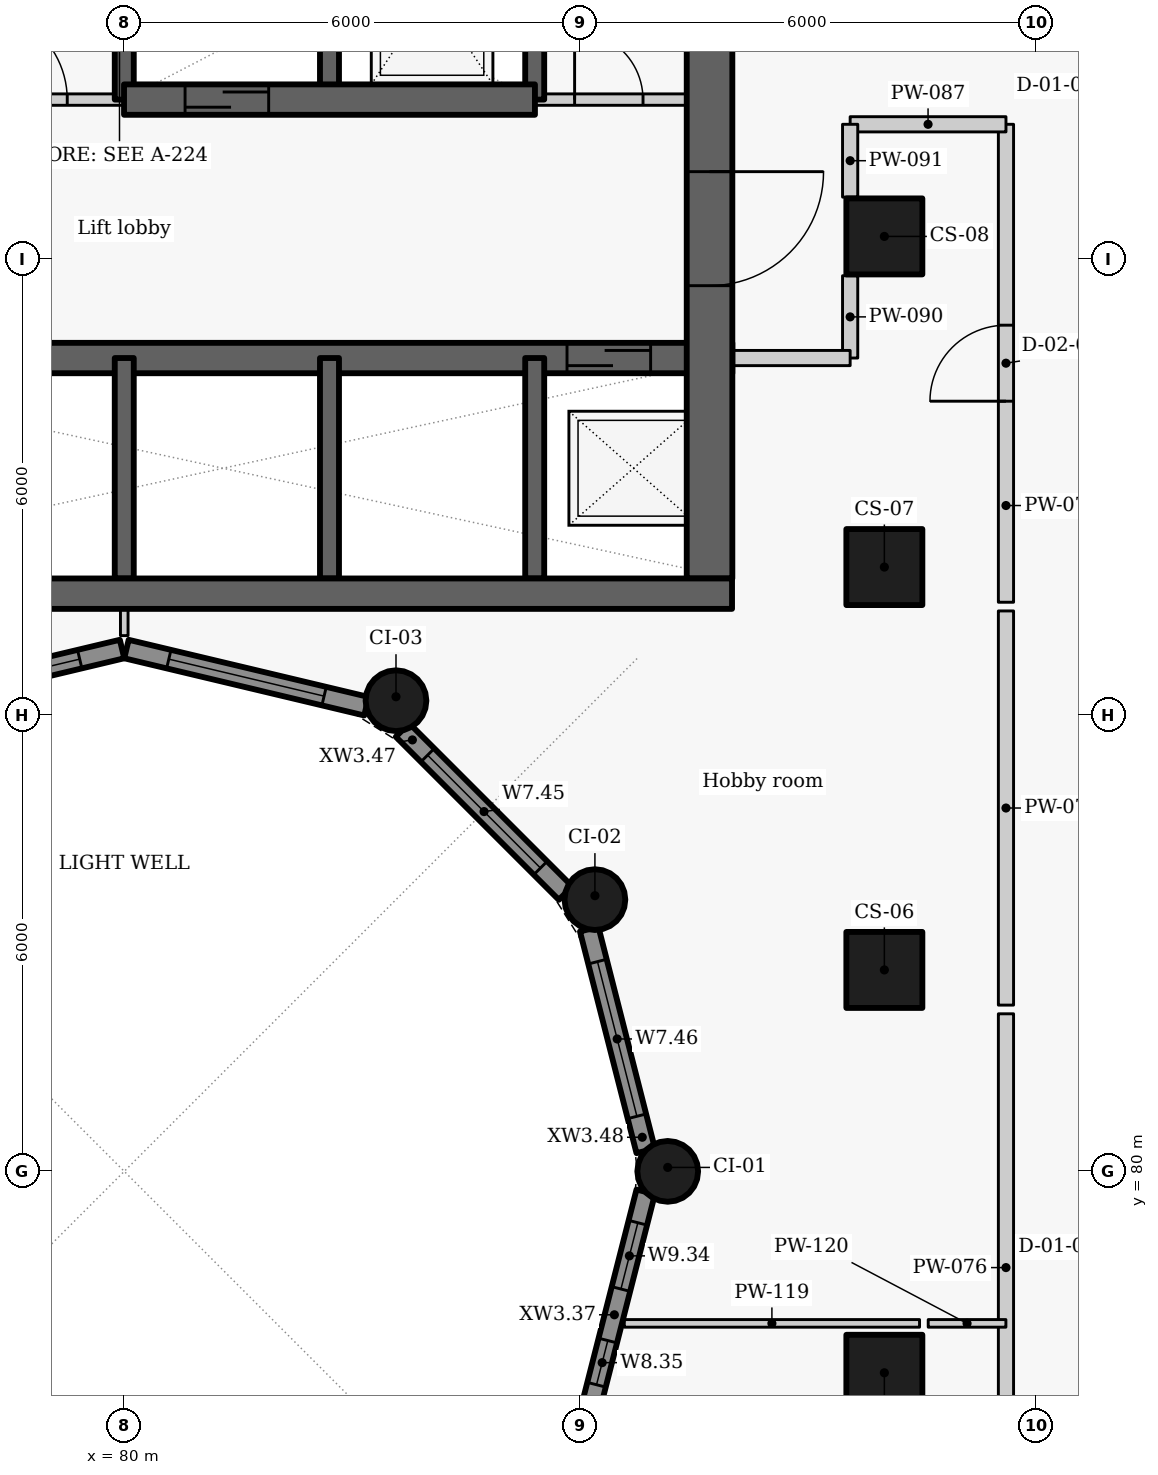
"""IFC4 building model, lengths in metres.
Left out: names, types, materials, properties, quantities, classifications, styles, units other than length and angle.
Written with IfcOpenShell. Run it as: python <this file> out.ifc"""

import sys

from ifc_helpers import new_model, si_unit, direction, frame, frame_2d, origin, origin_2d, place, context, subcontext, project, spatial, rectangle, circle, extrude, element, fill, save


model = new_model("IFC4")
c1 = context("Model", 3, precision=1e-05, world=origin(), true_north=direction((0.0, 1.0)))
c2 = subcontext(c1, "Body", "Model", "MODEL_VIEW")
j1 = project(units=[si_unit("LENGTHUNIT", "METRE"), si_unit("PLANEANGLEUNIT", "RADIAN")], contexts=[c1])
p1 = place(None, origin())
s1 = spatial("IfcSite", under=j1, at=p1, CompositionType="ELEMENT")
p2 = place(p1, origin())
s2 = spatial("IfcBuilding", under=s1, at=p2, CompositionType="ELEMENT")
p3 = place(p2, frame((0.0, 0.0, 127.2)))
s3 = spatial("IfcBuildingStorey", under=s2, at=p3, CompositionType="ELEMENT", Elevation=127.2)
for number, where, z_axis, x_axis in (
    (1, (90.0, 77.35, 0.0), (0.0, 0.0, 1.0), (0.0, 1.0, 0.0)),
    (2, (90.0, 82.65, 0.0), (0.0, 0.0, 1.0), (0.0, 1.0, 0.0)),
    (3, (90.0, 87.95, 0.0), (0.0, 0.0, 1.0), (0.0, 1.0, 0.0)),
    (4, (90.0, 92.3, 0.0), (0.0, 0.0, 1.0), (0.0, 1.0, 0.0)),
):
    element("IfcColumn", number, at=place(p3, frame(where, z_axis=z_axis, x_axis=x_axis)), inside=s3, PredefinedType="COLUMN", context=c2, shape_type="SweptSolid", body=[
        extrude(rectangle(XDim=1.0, YDim=1.0, at=origin_2d()), origin(), (0.0, 0.0, 1.0), 3.3),
    ])
for number, where, z_axis, x_axis in (
    (5, (87.15, 80.0, 0.0), (0.0, 0.0, 1.0), (0.0, 1.0, 0.0)),
    (6, (86.192, 83.575, 0.0), (0.0, 0.0, 1.0), (-0.5, 0.866, 0.0)),
    (7, (83.575, 86.192, 0.0), (0.0, 0.0, 1.0), (-0.866, 0.5, 0.0)),
):
    element("IfcColumn", number, at=place(p3, frame(where, z_axis=z_axis, x_axis=x_axis)), inside=s3, PredefinedType="COLUMN", context=c2, shape_type="SweptSolid", body=[
        extrude(circle(Radius=0.4, at=origin_2d()), origin(), (0.0, 0.0, 1.0), 3.3),
    ])
p4 = place(p3, frame((86.86, 79.73, 0.0), z_axis=(0.0, 0.0, 1.0), x_axis=(-0.247055971283, -0.969001211069, 0.0)))
e8 = element("IfcWall", 8, at=p4, inside=s3, PredefinedType="SOLIDWALL", context=c2, shape_type="SweptSolid", body=[
    extrude(rectangle(XDim=3.01, YDim=0.25, at=frame_2d((1.505, 0.0))), origin(), (0.0, 0.0, 1.0), 2.425),
])
p5 = place(p4, frame((0.419, 0.0, 0.9)))
e9 = element("IfcOpeningElement", 9, at=p5, cuts=e8, PredefinedType="OPENING", context=c2, shape_type="SweptSolid", body=[
    extrude(rectangle(XDim=0.9, YDim=1.1, at=frame_2d((0.45, 0.55))), frame((0.0, 0.135, 0.0), z_axis=(0.0, -1.0, 0.0), x_axis=(1.0, 0.0, 0.0)), (0.0, 0.0, 1.0), 0.27),
])
p6 = place(p4, frame((2.018, 0.0, 0.9)))
e10 = element("IfcOpeningElement", 10, at=p6, cuts=e8, PredefinedType="OPENING", context=c2, shape_type="SweptSolid", body=[
    extrude(rectangle(XDim=0.6, YDim=1.1, at=frame_2d((0.3, 0.55))), frame((0.0, 0.135, 0.0), z_axis=(0.0, -1.0, 0.0), x_axis=(1.0, 0.0, 0.0)), (0.0, 0.0, 1.0), 0.27),
])
p7 = place(p3, frame((76.814, 86.119, 0.0), z_axis=(0.0, 0.0, 1.0), x_axis=(0.972773113459, 0.231759508395, 0.0)))
e11 = element("IfcWall", 11, at=p7, inside=s3, PredefinedType="SOLIDWALL", context=c2, shape_type="SweptSolid", body=[
    extrude(rectangle(XDim=3.246, YDim=0.25, at=frame_2d((1.623, 0.0))), origin(), (0.0, 0.0, 1.0), 2.425),
])
p8 = place(p7, frame((0.573, 0.0, 0.9)))
e12 = element("IfcOpeningElement", 12, at=p8, cuts=e11, PredefinedType="OPENING", context=c2, shape_type="SweptSolid", body=[
    extrude(rectangle(XDim=2.1, YDim=1.1, at=frame_2d((1.05, 0.55))), frame((0.0, 0.135, 0.0), z_axis=(0.0, -1.0, 0.0), x_axis=(1.0, 0.0, 0.0)), (0.0, 0.0, 1.0), 0.27),
])
p9 = place(p3, frame((80.029, 86.872, 0.0), z_axis=(0.0, 0.0, 1.0), x_axis=(0.972773113459, -0.231759508395, 0.0)))
e13 = element("IfcWall", 13, at=p9, inside=s3, PredefinedType="SOLIDWALL", context=c2, shape_type="SweptSolid", body=[
    extrude(rectangle(XDim=3.246, YDim=0.25, at=frame_2d((1.623, 0.0))), origin(), (0.0, 0.0, 1.0), 2.425),
])
p10 = place(p9, frame((0.573, 0.0, 0.9)))
e14 = element("IfcOpeningElement", 14, at=p10, cuts=e13, PredefinedType="OPENING", context=c2, shape_type="SweptSolid", body=[
    extrude(rectangle(XDim=2.1, YDim=1.1, at=frame_2d((1.05, 0.55))), frame((0.0, 0.135, 0.0), z_axis=(0.0, -1.0, 0.0), x_axis=(1.0, 0.0, 0.0)), (0.0, 0.0, 1.0), 0.27),
])
p11 = place(p3, frame((83.661, 85.806, 0.0), z_axis=(0.0, 0.0, 1.0), x_axis=(0.707106781187, -0.707106781187, 0.0)))
e15 = element("IfcWall", 15, at=p11, inside=s3, PredefinedType="SOLIDWALL", context=c2, shape_type="SweptSolid", body=[
    extrude(rectangle(XDim=3.033, YDim=0.25, at=frame_2d((1.517, 0.0))), origin(), (0.0, 0.0, 1.0), 2.425),
])
p12 = place(p11, frame((0.467, 0.0, 0.9)))
e16 = element("IfcOpeningElement", 16, at=p12, cuts=e15, PredefinedType="OPENING", context=c2, shape_type="SweptSolid", body=[
    extrude(rectangle(XDim=2.1, YDim=1.1, at=frame_2d((1.05, 0.55))), frame((0.0, 0.135, 0.0), z_axis=(0.0, -1.0, 0.0), x_axis=(1.0, 0.0, 0.0)), (0.0, 0.0, 1.0), 0.27),
])
p13 = place(p3, frame((86.117, 83.187, 0.0), z_axis=(0.0, 0.0, 1.0), x_axis=(0.247055971283, -0.969001211069, 0.0)))
e17 = element("IfcWall", 17, at=p13, inside=s3, PredefinedType="SOLIDWALL", context=c2, shape_type="SweptSolid", body=[
    extrude(rectangle(XDim=3.01, YDim=0.25, at=frame_2d((1.505, 0.0))), origin(), (0.0, 0.0, 1.0), 2.425),
])
p14 = place(p13, frame((0.441, 0.0, 0.9)))
e18 = element("IfcOpeningElement", 18, at=p14, cuts=e17, PredefinedType="OPENING", context=c2, shape_type="SweptSolid", body=[
    extrude(rectangle(XDim=2.1, YDim=1.1, at=frame_2d((1.05, 0.55))), frame((0.0, 0.135, 0.0), z_axis=(0.0, -1.0, 0.0), x_axis=(1.0, 0.0, 0.0)), (0.0, 0.0, 1.0), 0.27),
])
p15 = place(p3, frame((74.6, 90.7, -0.41), z_axis=(0.0, 0.0, 1.0), x_axis=(1.0, 0.0, 0.0)))
e19 = element("IfcWall", 19, at=p15, inside=s3, PredefinedType="SHEAR", context=c2, shape_type="SweptSolid", body=[
    extrude(rectangle(XDim=13.4, YDim=0.4, at=frame_2d((6.7, 0.0))), origin(), (0.0, 0.0, 1.0), 3.435),
])
p16 = place(p15, frame((11.225, 0.0, 0.41)))
e20 = element("IfcOpeningElement", 20, at=p16, cuts=e19, PredefinedType="OPENING", context=c2, shape_type="SweptSolid", body=[
    extrude(rectangle(XDim=1.1, YDim=2.1, at=frame_2d((0.55, 1.05))), frame((0.0, 0.21, 0.0), z_axis=(0.0, -1.0, 0.0), x_axis=(1.0, 0.0, 0.0)), (0.0, 0.0, 1.0), 0.42),
])
p17 = place(p3, frame((80.0, 87.8, -0.41), z_axis=(0.0, 0.0, 1.0), x_axis=(0.0, 1.0, 0.0)))
e21 = element("IfcWall", 21, at=p17, inside=s3, PredefinedType="SHEAR", context=c2, shape_type="SweptSolid", body=[
    extrude(rectangle(XDim=2.9, YDim=0.25, at=frame_2d((1.45, 0.0))), origin(), (0.0, 0.0, 1.0), 3.435),
])
p18 = place(p3, frame((80.0, 94.1, -0.41), z_axis=(0.0, 0.0, 1.0), x_axis=(0.0, 1.0, 0.0)))
e22 = element("IfcWall", 22, at=p18, inside=s3, PredefinedType="SHEAR", context=c2, shape_type="SweptSolid", body=[
    extrude(rectangle(XDim=2.8, YDim=0.25, at=frame_2d((1.4, 0.0))), origin(), (0.0, 0.0, 1.0), 3.435),
])
p19 = place(p3, frame((82.7, 87.8, -0.41), z_axis=(0.0, 0.0, 1.0), x_axis=(0.0, 1.0, 0.0)))
e23 = element("IfcWall", 23, at=p19, inside=s3, PredefinedType="SHEAR", context=c2, shape_type="SweptSolid", body=[
    extrude(rectangle(XDim=2.9, YDim=0.25, at=frame_2d((1.45, 0.0))), origin(), (0.0, 0.0, 1.0), 3.435),
])
p20 = place(p3, frame((82.7, 94.1, -0.41), z_axis=(0.0, 0.0, 1.0), x_axis=(0.0, 1.0, 0.0)))
e24 = element("IfcWall", 24, at=p20, inside=s3, PredefinedType="SHEAR", context=c2, shape_type="SweptSolid", body=[
    extrude(rectangle(XDim=2.8, YDim=0.25, at=frame_2d((1.4, 0.0))), origin(), (0.0, 0.0, 1.0), 3.435),
])
p21 = place(p3, frame((85.4, 87.8, -0.41), z_axis=(0.0, 0.0, 1.0), x_axis=(0.0, 1.0, 0.0)))
e25 = element("IfcWall", 25, at=p21, inside=s3, PredefinedType="SHEAR", context=c2, shape_type="SweptSolid", body=[
    extrude(rectangle(XDim=2.9, YDim=0.25, at=frame_2d((1.45, 0.0))), origin(), (0.0, 0.0, 1.0), 3.435),
])
p22 = place(p3, frame((85.4, 94.1, -0.41), z_axis=(0.0, 0.0, 1.0), x_axis=(0.0, 1.0, 0.0)))
e26 = element("IfcWall", 26, at=p22, inside=s3, PredefinedType="SHEAR", context=c2, shape_type="SweptSolid", body=[
    extrude(rectangle(XDim=2.8, YDim=0.25, at=frame_2d((1.4, 0.0))), origin(), (0.0, 0.0, 1.0), 3.435),
])
p23 = place(p3, frame((87.7, 103.4, -0.41), z_axis=(0.0, 0.0, 1.0), x_axis=(0.0, -1.0, 0.0)))
e27 = element("IfcWall", 27, at=p23, inside=s3, PredefinedType="SHEAR", context=c2, shape_type="SweptSolid", body=[
    extrude(rectangle(XDim=15.6, YDim=0.6, at=frame_2d((7.8, 0.0))), origin(), (0.0, 0.0, 1.0), 3.435),
])
p24 = place(p23, frame((10.248, 0.0, 0.41)))
e28 = element("IfcOpeningElement", 28, at=p24, cuts=e27, PredefinedType="OPENING", context=c2, shape_type="SweptSolid", body=[
    extrude(rectangle(XDim=1.5, YDim=2.1, at=frame_2d((0.75, 1.05))), frame((0.0, 0.31, 0.0), z_axis=(0.0, -1.0, 0.0), x_axis=(1.0, 0.0, 0.0)), (0.0, 0.0, 1.0), 0.62),
])
p25 = place(p3, frame((77.297, 94.1, 0.0), z_axis=(0.0, 0.0, 1.0), x_axis=(1.0, 0.0, 0.0)))
e29 = element("IfcWall", 29, at=p25, inside=s3, PredefinedType="PARTITIONING", context=c2, shape_type="SweptSolid", body=[
    extrude(rectangle(XDim=2.706, YDim=0.15, at=frame_2d((1.353, 0.0))), origin(), (0.0, 0.0, 1.0), 3.025),
])
p26 = place(p25, frame((0.753, 0.0, 0.0)))
e30 = element("IfcOpeningElement", 30, at=p26, cuts=e29, PredefinedType="OPENING", context=c2, shape_type="SweptSolid", body=[
    extrude(rectangle(XDim=1.2, YDim=2.1, at=frame_2d((0.6, 1.05))), frame((0.0, 0.085, 0.0), z_axis=(0.0, -1.0, 0.0), x_axis=(1.0, 0.0, 0.0)), (0.0, 0.0, 1.0), 0.17),
])
p27 = place(p3, frame((85.397, 94.1, 0.0), z_axis=(0.0, 0.0, 1.0), x_axis=(1.0, 0.0, 0.0)))
e31 = element("IfcWall", 31, at=p27, inside=s3, PredefinedType="PARTITIONING", context=c2, shape_type="SweptSolid", body=[
    extrude(rectangle(XDim=2.603, YDim=0.15, at=frame_2d((1.302, 0.0))), origin(), (0.0, 0.0, 1.0), 3.025),
])
p28 = place(p27, frame((0.528, 0.0, 0.0)))
e32 = element("IfcOpeningElement", 32, at=p28, cuts=e31, PredefinedType="OPENING", context=c2, shape_type="SweptSolid", body=[
    extrude(rectangle(XDim=0.9, YDim=2.1, at=frame_2d((0.45, 1.05))), frame((0.0, 0.085, 0.0), z_axis=(0.0, -1.0, 0.0), x_axis=(1.0, 0.0, 0.0)), (0.0, 0.0, 1.0), 0.17),
])
p29 = place(p3, frame((79.997, 94.1, -0.41), z_axis=(0.0, 0.0, 1.0), x_axis=(1.0, 0.0, 0.0)))
e33 = element("IfcWall", 33, at=p29, inside=s3, PredefinedType="SHEAR", context=c2, shape_type="SweptSolid", body=[
    extrude(rectangle(XDim=5.406, YDim=0.4, at=frame_2d((2.703, 0.0))), origin(), (0.0, 0.0, 1.0), 3.435),
])
p30 = place(p29, frame((0.803, 0.0, 0.41)))
e34 = element("IfcOpeningElement", 34, at=p30, cuts=e33, PredefinedType="OPENING", context=c2, shape_type="SweptSolid", body=[
    extrude(rectangle(XDim=1.1, YDim=2.1, at=frame_2d((0.55, 1.05))), frame((0.0, 0.21, 0.0), z_axis=(0.0, -1.0, 0.0), x_axis=(1.0, 0.0, 0.0)), (0.0, 0.0, 1.0), 0.42),
])
p31 = place(p3, frame((91.6, 71.587, 0.0), z_axis=(0.0, 0.0, 1.0), x_axis=(0.0, 1.0, 0.0)))
e35 = element("IfcWall", 35, at=p31, inside=s3, PredefinedType="PARTITIONING", context=c2, shape_type="SweptSolid", body=[
    extrude(rectangle(XDim=10.486, YDim=0.2, at=frame_2d((5.243, 0.0))), origin(), (0.0, 0.0, 1.0), 3.025),
])
p32 = place(p31, frame((2.708, 0.0, 0.0)))
e36 = element("IfcOpeningElement", 36, at=p32, cuts=e35, PredefinedType="OPENING", context=c2, shape_type="SweptSolid", body=[
    extrude(rectangle(XDim=1.0, YDim=2.1, at=frame_2d((0.5, 1.05))), frame((0.0, 0.11, 0.0), z_axis=(0.0, -1.0, 0.0), x_axis=(1.0, 0.0, 0.0)), (0.0, 0.0, 1.0), 0.22),
])
p33 = place(p3, frame((91.6, 82.187, 0.0), z_axis=(0.0, 0.0, 1.0), x_axis=(0.0, 1.0, 0.0)))
e37 = element("IfcWall", 37, at=p33, inside=s3, PredefinedType="PARTITIONING", context=c2, shape_type="SweptSolid", body=[
    extrude(rectangle(XDim=5.186, YDim=0.2, at=frame_2d((2.593, 0.0))), origin(), (0.0, 0.0, 1.0), 3.025),
])
p34 = place(p3, frame((91.6, 87.487, 0.0), z_axis=(0.0, 0.0, 1.0), x_axis=(0.0, 1.0, 0.0)))
e38 = element("IfcWall", 38, at=p34, inside=s3, PredefinedType="PARTITIONING", context=c2, shape_type="SweptSolid", body=[
    extrude(rectangle(XDim=6.288, YDim=0.2, at=frame_2d((3.144, 0.0))), origin(), (0.0, 0.0, 1.0), 3.025),
])
p35 = place(p34, frame((2.645, 0.0, 0.0)))
e39 = element("IfcOpeningElement", 39, at=p35, cuts=e38, PredefinedType="OPENING", context=c2, shape_type="SweptSolid", body=[
    extrude(rectangle(XDim=1.0, YDim=2.1, at=frame_2d((0.5, 1.05))), frame((0.0, 0.11, 0.0), z_axis=(0.0, -1.0, 0.0), x_axis=(1.0, 0.0, 0.0)), (0.0, 0.0, 1.0), 0.22),
])
p36 = place(p3, frame((89.55, 93.775, 0.0), z_axis=(0.0, 0.0, 1.0), x_axis=(1.0, 0.0, 0.0)))
e40 = element("IfcWall", 40, at=p36, inside=s3, PredefinedType="PARTITIONING", context=c2, shape_type="SweptSolid", body=[
    extrude(rectangle(XDim=2.05, YDim=0.2, at=frame_2d((1.025, 0.0))), origin(), (0.0, 0.0, 1.0), 2.505),
])
p37 = place(p3, frame((89.55, 90.7, 0.0), z_axis=(0.0, 0.0, 1.0), x_axis=(0.0, 1.0, 0.0)))
e41 = element("IfcWall", 41, at=p37, inside=s3, PredefinedType="PARTITIONING", context=c2, shape_type="SweptSolid", body=[
    extrude(rectangle(XDim=1.083, YDim=0.2, at=frame_2d((0.542, 0.0))), origin(), (0.0, 0.0, 1.0), 3.025),
])
p38 = place(p3, frame((89.55, 92.817, 0.0), z_axis=(0.0, 0.0, 1.0), x_axis=(0.0, 1.0, 0.0)))
e42 = element("IfcWall", 42, at=p38, inside=s3, PredefinedType="PARTITIONING", context=c2, shape_type="SweptSolid", body=[
    extrude(rectangle(XDim=0.958, YDim=0.2, at=frame_2d((0.479, 0.0))), origin(), (0.0, 0.0, 1.0), 3.025),
])
p39 = place(p3, frame((88.0, 90.7, 0.0), z_axis=(0.0, 0.0, 1.0), x_axis=(1.0, 0.0, 0.0)))
e43 = element("IfcWall", 43, at=p39, inside=s3, PredefinedType="PARTITIONING", context=c2, shape_type="SweptSolid", body=[
    extrude(rectangle(XDim=1.55, YDim=0.2, at=frame_2d((0.775, 0.0))), origin(), (0.0, 0.0, 1.0), 3.025),
])
p40 = place(p3, frame((80.0, 87.048, 0.0), z_axis=(0.0, 0.0, 1.0), x_axis=(0.0, 1.0, 0.0)))
e44 = element("IfcWall", 44, at=p40, inside=s3, PredefinedType="PARTITIONING", context=c2, shape_type="SweptSolid", body=[
    extrude(rectangle(XDim=0.352, YDim=0.1, at=frame_2d((0.176, 0.0))), origin(), (0.0, 0.0, 1.0), 3.025),
])
p41 = place(p3, frame((86.578, 78.0, 0.0), z_axis=(0.0, 0.0, 1.0), x_axis=(1.0, 0.0, 0.0)))
e45 = element("IfcWall", 45, at=p41, inside=s3, PredefinedType="PARTITIONING", context=c2, shape_type="SweptSolid", body=[
    extrude(rectangle(XDim=3.885, YDim=0.1, at=frame_2d((1.942, 0.0))), origin(), (0.0, 0.0, 1.0), 2.505),
])
p42 = place(p3, frame((90.577, 78.0, 0.0), z_axis=(0.0, 0.0, 1.0), x_axis=(1.0, 0.0, 0.0)))
e46 = element("IfcWall", 46, at=p42, inside=s3, PredefinedType="PARTITIONING", context=c2, shape_type="SweptSolid", body=[
    extrude(rectangle(XDim=1.022, YDim=0.1, at=frame_2d((0.511, 0.0))), origin(), (0.0, 0.0, 1.0), 3.025),
])
p43 = place(p3, frame((72.004, 87.6, -0.41), z_axis=(0.0, 0.0, 1.0), x_axis=(1.0, 0.0, 0.0)))
e47 = element("IfcWall", 47, at=p43, inside=s3, PredefinedType="SHEAR", context=c2, shape_type="SweptSolid", body=[
    extrude(rectangle(XDim=15.992, YDim=0.4, at=frame_2d((7.996, 0.0))), origin(), (0.0, 0.0, 1.0), 3.435),
])
p44 = place(p5, origin())
e48 = element("IfcWindow", 48, at=p44, inside=s3, PartitioningType="SINGLE_PANEL", PredefinedType="WINDOW", context=c2, shape_type="SweptSolid", body=[
    extrude(rectangle(XDim=0.9, YDim=1.1, at=frame_2d((0.45, 0.55))), frame((0.0, 0.03, 0.0), z_axis=(0.0, -1.0, 0.0), x_axis=(1.0, 0.0, 0.0)), (0.0, 0.0, 1.0), 0.06),
])
fill(e9, e48)
p45 = place(p6, origin())
e49 = element("IfcWindow", 49, at=p45, inside=s3, PartitioningType="SINGLE_PANEL", PredefinedType="WINDOW", context=c2, shape_type="SweptSolid", body=[
    extrude(rectangle(XDim=0.6, YDim=1.1, at=frame_2d((0.3, 0.55))), frame((0.0, 0.03, 0.0), z_axis=(0.0, -1.0, 0.0), x_axis=(1.0, 0.0, 0.0)), (0.0, 0.0, 1.0), 0.06),
])
fill(e10, e49)
p46 = place(p8, origin())
e50 = element("IfcWindow", 50, at=p46, inside=s3, PartitioningType="SINGLE_PANEL", PredefinedType="WINDOW", context=c2, shape_type="SweptSolid", body=[
    extrude(rectangle(XDim=2.1, YDim=1.1, at=frame_2d((1.05, 0.55))), frame((0.0, 0.03, 0.0), z_axis=(0.0, -1.0, 0.0), x_axis=(1.0, 0.0, 0.0)), (0.0, 0.0, 1.0), 0.06),
])
fill(e12, e50)
p47 = place(p10, origin())
e51 = element("IfcWindow", 51, at=p47, inside=s3, PartitioningType="SINGLE_PANEL", PredefinedType="WINDOW", context=c2, shape_type="SweptSolid", body=[
    extrude(rectangle(XDim=2.1, YDim=1.1, at=frame_2d((1.05, 0.55))), frame((0.0, 0.03, 0.0), z_axis=(0.0, -1.0, 0.0), x_axis=(1.0, 0.0, 0.0)), (0.0, 0.0, 1.0), 0.06),
])
fill(e14, e51)
p48 = place(p12, origin())
e52 = element("IfcWindow", 52, at=p48, inside=s3, PartitioningType="SINGLE_PANEL", PredefinedType="WINDOW", context=c2, shape_type="SweptSolid", body=[
    extrude(rectangle(XDim=2.1, YDim=1.1, at=frame_2d((1.05, 0.55))), frame((0.0, 0.03, 0.0), z_axis=(0.0, -1.0, 0.0), x_axis=(1.0, 0.0, 0.0)), (0.0, 0.0, 1.0), 0.06),
])
fill(e16, e52)
p49 = place(p14, origin())
e53 = element("IfcWindow", 53, at=p49, inside=s3, PartitioningType="SINGLE_PANEL", PredefinedType="WINDOW", context=c2, shape_type="SweptSolid", body=[
    extrude(rectangle(XDim=2.1, YDim=1.1, at=frame_2d((1.05, 0.55))), frame((0.0, 0.03, 0.0), z_axis=(0.0, -1.0, 0.0), x_axis=(1.0, 0.0, 0.0)), (0.0, 0.0, 1.0), 0.06),
])
fill(e18, e53)
p50 = place(p16, origin())
e54 = element("IfcDoor", 54, at=p50, inside=s3, OperationType="SLIDING_TO_LEFT", PredefinedType="DOOR", context=c2, shape_type="SweptSolid", body=[
    extrude(rectangle(XDim=1.1, YDim=2.1, at=frame_2d((0.55, 1.05))), frame((0.0, 0.025, 0.0), z_axis=(0.0, -1.0, 0.0), x_axis=(1.0, 0.0, 0.0)), (0.0, 0.0, 1.0), 0.05),
])
fill(e20, e54)
p51 = place(p26, origin())
e55 = element("IfcDoor", 55, at=p51, inside=s3, OperationType="DOUBLE_DOOR_SINGLE_SWING", PredefinedType="DOOR", context=c2, shape_type="SweptSolid", body=[
    extrude(rectangle(XDim=1.2, YDim=2.1, at=frame_2d((0.6, 1.05))), frame((0.0, 0.025, 0.0), z_axis=(0.0, -1.0, 0.0), x_axis=(1.0, 0.0, 0.0)), (0.0, 0.0, 1.0), 0.05),
])
fill(e30, e55)
p52 = place(p30, origin())
e56 = element("IfcDoor", 56, at=p52, inside=s3, OperationType="SLIDING_TO_LEFT", PredefinedType="DOOR", context=c2, shape_type="SweptSolid", body=[
    extrude(rectangle(XDim=1.1, YDim=2.1, at=frame_2d((0.55, 1.05))), frame((0.0, 0.025, 0.0), z_axis=(0.0, -1.0, 0.0), x_axis=(1.0, 0.0, 0.0)), (0.0, 0.0, 1.0), 0.05),
])
fill(e34, e56)
p53 = place(p28, origin())
e57 = element("IfcDoor", 57, at=p53, inside=s3, OperationType="SINGLE_SWING_LEFT", PredefinedType="DOOR", context=c2, shape_type="SweptSolid", body=[
    extrude(rectangle(XDim=0.9, YDim=2.1, at=frame_2d((0.45, 1.05))), frame((0.0, 0.025, 0.0), z_axis=(0.0, -1.0, 0.0), x_axis=(1.0, 0.0, 0.0)), (0.0, 0.0, 1.0), 0.05),
])
fill(e32, e57)
p54 = place(p35, origin())
e58 = element("IfcDoor", 58, at=p54, inside=s3, OperationType="SINGLE_SWING_LEFT", PredefinedType="DOOR", context=c2, shape_type="SweptSolid", body=[
    extrude(rectangle(XDim=1.0, YDim=2.1, at=frame_2d((0.5, 1.05))), frame((0.0, 0.025, 0.0), z_axis=(0.0, -1.0, 0.0), x_axis=(1.0, 0.0, 0.0)), (0.0, 0.0, 1.0), 0.05),
])
fill(e39, e58)
p55 = place(p24, origin())
e59 = element("IfcDoor", 59, at=p55, inside=s3, OperationType="DOUBLE_DOOR_SINGLE_SWING", PredefinedType="DOOR", context=c2, shape_type="SweptSolid", body=[
    extrude(rectangle(XDim=1.5, YDim=2.1, at=frame_2d((0.75, 1.05))), frame((0.0, 0.025, 0.0), z_axis=(0.0, -1.0, 0.0), x_axis=(1.0, 0.0, 0.0)), (0.0, 0.0, 1.0), 0.05),
])
fill(e28, e59)
save(model, sys.argv[1])
